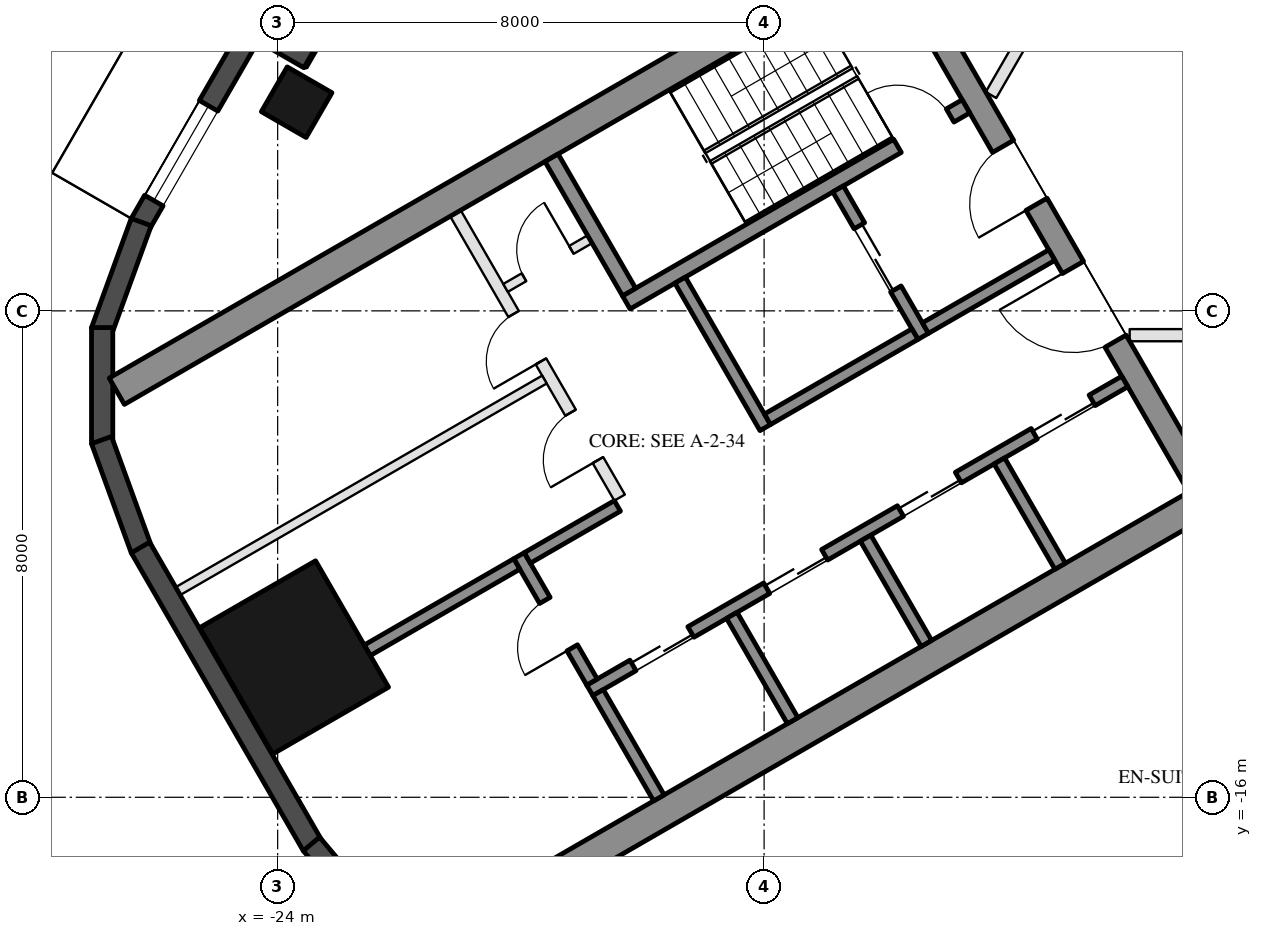
"""IFC4 building model, lengths in metres.
Left out: names, types, materials, properties, quantities, classifications, styles, units other than length and angle.
Written with IfcOpenShell. Run it as: python <this file> out.ifc"""

import sys

from ifc_helpers import new_model, si_unit, direction, frame, frame_2d, origin, origin_2d, place, context, subcontext, project, spatial, rectangle, hollow_rectangle, extrude, element, fill, save


model = new_model("IFC4")
c1 = context("Model", 3, precision=1e-05, world=origin(), true_north=direction((0.0, 1.0)))
c2 = subcontext(c1, "Body", "Model", "MODEL_VIEW")
j1 = project(units=[si_unit("LENGTHUNIT", "METRE"), si_unit("PLANEANGLEUNIT", "RADIAN")], contexts=[c1])
p1 = place(None, origin())
s1 = spatial("IfcSite", under=j1, at=p1, CompositionType="ELEMENT")
p2 = place(p1, origin())
s2 = spatial("IfcBuilding", under=s1, at=p2, CompositionType="ELEMENT")
p3 = place(p2, frame((0.0, 0.0, 150.3)))
s3 = spatial("IfcBuildingStorey", under=s2, at=p3, CompositionType="ELEMENT", Elevation=150.3)
p4 = place(p3, frame((-23.688, -4.568, 0.0), z_axis=(0.0, 0.0, 1.0), x_axis=(0.5, 0.866025403784, 0.0)))
e1 = element("IfcColumn", 1, at=p4, inside=s3, PredefinedType="COLUMN", context=c2, shape_type="SweptSolid", body=[
    extrude(hollow_rectangle(XDim=0.85, YDim=0.85, WallThickness=0.04, at=origin_2d()), origin(), (0.0, 0.0, 1.0), 3.7),
])
p5 = place(p3, frame((-23.729, -13.7, 0.0), z_axis=(0.0, 0.0, 1.0), x_axis=(-0.5, 0.866025403784, 0.0)))
e2 = element("IfcColumn", 2, at=p5, inside=s3, PredefinedType="COLUMN", context=c2, shape_type="SweptSolid", body=[
    extrude(hollow_rectangle(XDim=2.4, YDim=2.2, WallThickness=0.06, at=origin_2d()), origin(), (0.0, 0.0, 1.0), 3.7),
])
p6 = place(p3, frame((-20.309, 1.934, 0.0), z_axis=(0.0, 0.0, 1.0), x_axis=(-0.499992114976, -0.866029956157, 0.0)))
e3 = element("IfcWall", 3, at=p6, inside=s3, PredefinedType="SOLIDWALL", context=c2, shape_type="SweptSolid", body=[
    extrude(rectangle(XDim=6.74, YDim=0.35, at=frame_2d((3.37, 0.0))), origin(), (0.0, 0.0, 1.0), 3.55),
])
p7 = place(p6, frame((0.77, 0.0, 0.0)))
e4 = element("IfcOpeningElement", 4, at=p7, cuts=e3, PredefinedType="OPENING", context=c2, shape_type="SweptSolid", body=[
    extrude(rectangle(XDim=2.4, YDim=2.4, at=frame_2d((1.2, 1.2))), frame((0.0, 0.185, 0.0), z_axis=(0.0, -1.0, 0.0), x_axis=(1.0, 0.0, 0.0)), (0.0, 0.0, 1.0), 0.37),
])
p8 = place(p6, frame((3.47, 0.0, 0.3)))
e5 = element("IfcOpeningElement", 5, at=p8, cuts=e3, PredefinedType="OPENING", context=c2, shape_type="SweptSolid", body=[
    extrude(rectangle(XDim=2.9, YDim=2.65, at=frame_2d((1.45, 1.325))), frame((0.0, 0.185, 0.0), z_axis=(0.0, -1.0, 0.0), x_axis=(1.0, 0.0, 0.0)), (0.0, 0.0, 1.0), 0.37),
])
p9 = place(p3, frame((-23.481, -3.85, 0.0), z_axis=(0.0, 0.0, 1.0), x_axis=(-0.866092288191, 0.499884134912, 0.0)))
e6 = element("IfcWall", 6, at=p9, inside=s3, PredefinedType="SOLIDWALL", context=c2, shape_type="SweptSolid", body=[
    extrude(rectangle(XDim=1.22, YDim=0.35, at=frame_2d((0.61, 0.0))), origin(), (0.0, 0.0, 1.0), 3.55),
])
p10 = place(p3, frame((-24.299, -3.176, 0.0), z_axis=(0.0, 0.0, 1.0), x_axis=(-0.500028278809, -0.866009076391, 0.0)))
e7 = element("IfcWall", 7, at=p10, inside=s3, PredefinedType="SOLIDWALL", context=c2, shape_type="SweptSolid", body=[
    extrude(rectangle(XDim=3.916, YDim=0.35, at=frame_2d((1.958, 0.0))), origin(), (0.0, 0.0, 1.0), 3.55),
])
p11 = place(p10, frame((1.675, 0.0, 0.3)))
e8 = element("IfcOpeningElement", 8, at=p11, cuts=e7, PredefinedType="OPENING", context=c2, shape_type="SweptSolid", body=[
    extrude(rectangle(XDim=1.8, YDim=2.65, at=frame_2d((0.9, 1.325))), frame((0.0, 0.185, 0.0), z_axis=(0.0, -1.0, 0.0), x_axis=(1.0, 0.0, 0.0)), (0.0, 0.0, 1.0), 0.37),
])
for number, where, z_axis, x_axis in (
    (9, (-26.244, -6.54, 0.0), (0.0, 0.0, 1.0), (-0.342, -0.94, 0.0)),
    (10, (-26.886, -8.275, 0.0), (0.0, 0.0, 1.0), (0.0, -1.0, 0.0)),
    (11, (-26.897, -10.125, 0.0), (0.0, 0.0, 1.0), (0.342, -0.94, 0.0)),
):
    element("IfcWall", number, at=place(p3, frame(where, z_axis=z_axis, x_axis=x_axis)), inside=s3, PredefinedType="SOLIDWALL", context=c2, shape_type="SweptSolid", body=[
        extrude(rectangle(XDim=1.91, YDim=0.35, at=frame_2d((0.955, 0.0))), origin(), (0.0, 0.0, 1.0), 3.55),
    ])
p12 = place(p3, frame((-26.257, -11.893, 0.0), z_axis=(0.0, 0.0, 1.0), x_axis=(0.500018773155, -0.866014564827, 0.0)))
e12 = element("IfcWall", 12, at=p12, inside=s3, PredefinedType="SOLIDWALL", context=c2, shape_type="SweptSolid", body=[
    extrude(rectangle(XDim=5.658, YDim=0.35, at=frame_2d((2.829, 0.0))), origin(), (0.0, 0.0, 1.0), 3.55),
])
p13 = place(p3, frame((-23.445, -16.768, 0.0), z_axis=(0.0, 0.0, 1.0), x_axis=(0.642733291068, -0.76609001857, 0.0)))
e13 = element("IfcWall", 13, at=p13, inside=s3, PredefinedType="SOLIDWALL", context=c2, shape_type="SweptSolid", body=[
    extrude(rectangle(XDim=1.91, YDim=0.35, at=frame_2d((0.955, 0.0))), origin(), (0.0, 0.0, 1.0), 3.55),
])
for number, where, z_axis, x_axis in (
    (14, (-13.797, -1.903, 0.0), (0.0, 0.0, 1.0), (-0.866, -0.5, 0.0)),
    (15, (-8.547, -10.997, 0.0), (0.0, 0.0, 1.0), (-0.866, -0.5, 0.0)),
):
    element("IfcWall", number, at=place(p3, frame(where, z_axis=z_axis, x_axis=x_axis)), inside=s3, PredefinedType="SHEAR", context=c2, shape_type="SweptSolid", body=[
        extrude(rectangle(XDim=14.837, YDim=0.5, at=frame_2d((7.418, 0.0))), origin(), (0.0, 0.0, 1.0), 3.5),
    ])
p14 = place(p3, frame((-13.845, -2.22, 0.0), z_axis=(0.0, 0.0, 1.0), x_axis=(0.500004234368, -0.866022959057, 0.0)))
e16 = element("IfcWall", 16, at=p14, inside=s3, PredefinedType="SHEAR", context=c2, shape_type="SweptSolid", body=[
    extrude(rectangle(XDim=10.0, YDim=0.4, at=frame_2d((5.0, 0.0))), origin(), (0.0, 0.0, 1.0), 3.5),
])
p15 = place(p14, frame((3.55, 0.0, 0.0)))
e17 = element("IfcOpeningElement", 17, at=p15, cuts=e16, PredefinedType="OPENING", context=c2, shape_type="SweptSolid", body=[
    extrude(rectangle(XDim=1.1, YDim=2.1, at=frame_2d((0.55, 1.05))), frame((0.0, 0.21, 0.0), z_axis=(0.0, -1.0, 0.0), x_axis=(1.0, 0.0, 0.0)), (0.0, 0.0, 1.0), 0.42),
])
p16 = place(p14, frame((5.85, 0.0, 0.0)))
e18 = element("IfcOpeningElement", 18, at=p16, cuts=e16, PredefinedType="OPENING", context=c2, shape_type="SweptSolid", body=[
    extrude(rectangle(XDim=1.4, YDim=2.1, at=frame_2d((0.7, 1.05))), frame((0.0, 0.21, 0.0), z_axis=(0.0, -1.0, 0.0), x_axis=(1.0, 0.0, 0.0)), (0.0, 0.0, 1.0), 0.42),
])
p17 = place(p3, frame((-12.681, -4.636, 0.0), z_axis=(0.0, 0.0, 1.0), x_axis=(-0.866021702275, -0.500006411147, 0.0)))
e19 = element("IfcWall", 19, at=p17, inside=s3, PredefinedType="SHEAR", context=c2, shape_type="SweptSolid", body=[
    extrude(rectangle(XDim=6.45, YDim=0.25, at=frame_2d((3.225, 0.0))), origin(), (0.0, 0.0, 1.0), 3.5),
])
p18 = place(p17, frame((0.3, 0.0, 0.0)))
e20 = element("IfcOpeningElement", 20, at=p18, cuts=e19, PredefinedType="OPENING", context=c2, shape_type="SweptSolid", body=[
    extrude(rectangle(XDim=1.0, YDim=2.1, at=frame_2d((0.5, 1.05))), frame((0.0, 0.135, 0.0), z_axis=(0.0, -1.0, 0.0), x_axis=(1.0, 0.0, 0.0)), (0.0, 0.0, 1.0), 0.27),
])
p19 = place(p3, frame((-19.496, -5.482, 0.0), z_axis=(0.0, 0.0, 1.0), x_axis=(0.499990435942, -0.866030925526, 0.0)))
e21 = element("IfcWall", 21, at=p19, inside=s3, PredefinedType="SHEAR", context=c2, shape_type="SweptSolid", body=[
    extrude(rectangle(XDim=2.55, YDim=0.25, at=frame_2d((1.275, 0.0))), origin(), (0.0, 0.0, 1.0), 3.5),
])
p20 = place(p3, frame((-17.381, -7.495, 0.0), z_axis=(0.0, 0.0, 1.0), x_axis=(0.500011755427, -0.866018616679, 0.0)))
e22 = element("IfcWall", 22, at=p20, inside=s3, PredefinedType="SHEAR", context=c2, shape_type="SweptSolid", body=[
    extrude(rectangle(XDim=2.8, YDim=0.2, at=frame_2d((1.4, 0.0))), origin(), (0.0, 0.0, 1.0), 3.5),
])
p21 = place(p3, frame((-14.783, -5.995, 0.0), z_axis=(0.0, 0.0, 1.0), x_axis=(0.49994636267, -0.866056369097, 0.0)))
e23 = element("IfcWall", 23, at=p21, inside=s3, PredefinedType="SHEAR", context=c2, shape_type="SweptSolid", body=[
    extrude(rectangle(XDim=2.8, YDim=0.2, at=frame_2d((1.4, 0.0))), origin(), (0.0, 0.0, 1.0), 3.5),
])
p22 = place(p21, frame((0.7, 0.0, 0.0)))
e24 = element("IfcOpeningElement", 24, at=p22, cuts=e23, PredefinedType="OPENING", context=c2, shape_type="SweptSolid", body=[
    extrude(rectangle(XDim=1.2, YDim=2.1, at=frame_2d((0.6, 1.05))), frame((0.0, 0.11, 0.0), z_axis=(0.0, -1.0, 0.0), x_axis=(1.0, 0.0, 0.0)), (0.0, 0.0, 1.0), 0.22),
])
p23 = place(p3, frame((-13.52, -8.383, 0.0), z_axis=(0.0, 0.0, 1.0), x_axis=(-0.866034573852, -0.49998411664, 0.0)))
e25 = element("IfcWall", 25, at=p23, inside=s3, PredefinedType="SHEAR", context=c2, shape_type="SweptSolid", body=[
    extrude(rectangle(XDim=2.8, YDim=0.2, at=frame_2d((1.4, 0.0))), origin(), (0.0, 0.0, 1.0), 3.5),
])
p24 = place(p3, frame((-11.268, -7.083, 0.0), z_axis=(0.0, 0.0, 1.0), x_axis=(-0.866050077142, -0.499957262057, 0.0)))
e26 = element("IfcWall", 26, at=p24, inside=s3, PredefinedType="SHEAR", context=c2, shape_type="SweptSolid", body=[
    extrude(rectangle(XDim=2.4, YDim=0.2, at=frame_2d((1.2, 0.0))), origin(), (0.0, 0.0, 1.0), 3.5),
])
p25 = place(p3, frame((-10.068, -9.162, 0.0), z_axis=(0.0, 0.0, 1.0), x_axis=(-0.866032725843, -0.499987317609, 0.0)))
e27 = element("IfcWall", 27, at=p25, inside=s3, PredefinedType="SHEAR", context=c2, shape_type="SweptSolid", body=[
    extrude(rectangle(XDim=10.16, YDim=0.2, at=frame_2d((5.08, 0.0))), origin(), (0.0, 0.0, 1.0), 3.5),
])
p26 = place(p25, frame((0.62, 0.0, 0.0)))
e28 = element("IfcOpeningElement", 28, at=p26, cuts=e27, PredefinedType="OPENING", context=c2, shape_type="SweptSolid", body=[
    extrude(rectangle(XDim=1.1, YDim=2.1, at=frame_2d((0.55, 1.05))), frame((0.0, 0.11, 0.0), z_axis=(0.0, -1.0, 0.0), x_axis=(1.0, 0.0, 0.0)), (0.0, 0.0, 1.0), 0.22),
])
p27 = place(p25, frame((3.16, 0.0, 0.0)))
e29 = element("IfcOpeningElement", 29, at=p27, cuts=e27, PredefinedType="OPENING", context=c2, shape_type="SweptSolid", body=[
    extrude(rectangle(XDim=1.1, YDim=2.1, at=frame_2d((0.55, 1.05))), frame((0.0, 0.11, 0.0), z_axis=(0.0, -1.0, 0.0), x_axis=(1.0, 0.0, 0.0)), (0.0, 0.0, 1.0), 0.22),
])
p28 = place(p25, frame((5.7, 0.0, 0.0)))
e30 = element("IfcOpeningElement", 30, at=p28, cuts=e27, PredefinedType="OPENING", context=c2, shape_type="SweptSolid", body=[
    extrude(rectangle(XDim=1.1, YDim=2.1, at=frame_2d((0.55, 1.05))), frame((0.0, 0.11, 0.0), z_axis=(0.0, -1.0, 0.0), x_axis=(1.0, 0.0, 0.0)), (0.0, 0.0, 1.0), 0.22),
])
p29 = place(p25, frame((8.24, 0.0, 0.0)))
e31 = element("IfcOpeningElement", 31, at=p29, cuts=e27, PredefinedType="OPENING", context=c2, shape_type="SweptSolid", body=[
    extrude(rectangle(XDim=1.1, YDim=2.1, at=frame_2d((0.55, 1.05))), frame((0.0, 0.11, 0.0), z_axis=(0.0, -1.0, 0.0), x_axis=(1.0, 0.0, 0.0)), (0.0, 0.0, 1.0), 0.22),
])
p30 = place(p3, frame((-20.031, -12.026, 0.0), z_axis=(0.0, 0.0, 1.0), x_axis=(0.500033551112, -0.866006032174, 0.0)))
e32 = element("IfcWall", 32, at=p30, inside=s3, PredefinedType="SHEAR", context=c2, shape_type="SweptSolid", body=[
    extrude(rectangle(XDim=2.4, YDim=0.2, at=frame_2d((1.2, 0.0))), origin(), (0.0, 0.0, 1.0), 3.5),
])
p31 = place(p30, frame((0.85, 0.0, 0.0)))
e33 = element("IfcOpeningElement", 33, at=p31, cuts=e32, PredefinedType="OPENING", context=c2, shape_type="SweptSolid", body=[
    extrude(rectangle(XDim=0.9, YDim=2.1, at=frame_2d((0.45, 1.05))), frame((0.0, 0.11, 0.0), z_axis=(0.0, -1.0, 0.0), x_axis=(1.0, 0.0, 0.0)), (0.0, 0.0, 1.0), 0.22),
])
p32 = place(p3, frame((-18.413, -11.208, 0.0), z_axis=(0.0, 0.0, 1.0), x_axis=(-0.866038183914, -0.499977863513, 0.0)))
e34 = element("IfcWall", 34, at=p32, inside=s3, PredefinedType="SHEAR", context=c2, shape_type="SweptSolid", body=[
    extrude(rectangle(XDim=1.71, YDim=0.2, at=frame_2d((0.855, 0.0))), origin(), (0.0, 0.0, 1.0), 3.5),
])
for number, where, z_axis, x_axis in (
    (35, (-12.131, -10.468, 0.0), (0.0, 0.0, 1.0), (0.5, -0.866, 0.0)),
    (36, (-14.331, -11.738, 0.0), (0.0, 0.0, 1.0), (0.5, -0.866, 0.0)),
    (37, (-16.531, -13.008, 0.0), (0.0, 0.0, 1.0), (0.5, -0.866, 0.0)),
    (38, (-18.73, -14.278, 0.0), (0.0, 0.0, 1.0), (0.5, -0.866, 0.0)),
):
    element("IfcWall", number, at=place(p3, frame(where, z_axis=z_axis, x_axis=x_axis)), inside=s3, PredefinedType="SHEAR", context=c2, shape_type="SweptSolid", body=[
        extrude(rectangle(XDim=2.0, YDim=0.2, at=frame_2d((1.0, 0.0))), origin(), (0.0, 0.0, 1.0), 3.5),
    ])
p33 = place(p3, frame((-20.067, -12.163, 0.0), z_axis=(0.0, 0.0, 1.0), x_axis=(-0.866055327414, -0.49994816717, 0.0)))
e39 = element("IfcWall", 39, at=p33, inside=s3, PredefinedType="SHEAR", context=c2, shape_type="SweptSolid", body=[
    extrude(rectangle(XDim=2.84, YDim=0.2, at=frame_2d((1.42, 0.0))), origin(), (0.0, 0.0, 1.0), 3.5),
])
p34 = place(p3, frame((-21.076, -6.395, 0.0), z_axis=(0.0, 0.0, 1.0), x_axis=(0.50001468107, -0.866016927499, 0.0)))
e40 = element("IfcWall", 40, at=p34, inside=s3, PredefinedType="PARTITIONING", context=c2, shape_type="SweptSolid", body=[
    extrude(rectangle(XDim=5.4, YDim=0.2, at=frame_2d((2.7, 0.0))), origin(), (0.0, 0.0, 1.0), 3.5),
])
p35 = place(p34, frame((1.913, 0.0, 0.0)))
e41 = element("IfcOpeningElement", 41, at=p35, cuts=e40, PredefinedType="OPENING", context=c2, shape_type="SweptSolid", body=[
    extrude(rectangle(XDim=0.9, YDim=2.1, at=frame_2d((0.45, 1.05))), frame((0.0, 0.11, 0.0), z_axis=(0.0, -1.0, 0.0), x_axis=(1.0, 0.0, 0.0)), (0.0, 0.0, 1.0), 0.22),
])
p36 = place(p34, frame((3.788, 0.0, 0.0)))
e42 = element("IfcOpeningElement", 42, at=p36, cuts=e40, PredefinedType="OPENING", context=c2, shape_type="SweptSolid", body=[
    extrude(rectangle(XDim=0.9, YDim=2.1, at=frame_2d((0.45, 1.05))), frame((0.0, 0.11, 0.0), z_axis=(0.0, -1.0, 0.0), x_axis=(1.0, 0.0, 0.0)), (0.0, 0.0, 1.0), 0.22),
])
p37 = place(p3, frame((-18.866, -6.822, 0.0), z_axis=(0.0, 0.0, 1.0), x_axis=(-0.866028054938, -0.499995408039, 0.0)))
e43 = element("IfcWall", 43, at=p37, inside=s3, PredefinedType="PARTITIONING", context=c2, shape_type="SweptSolid", body=[
    extrude(rectangle(XDim=1.6, YDim=0.15, at=frame_2d((0.8, 0.0))), origin(), (0.0, 0.0, 1.0), 3.5),
])
p38 = place(p37, frame((0.35, 0.0, 0.0)))
e44 = element("IfcOpeningElement", 44, at=p38, cuts=e43, PredefinedType="OPENING", context=c2, shape_type="SweptSolid", body=[
    extrude(rectangle(XDim=0.9, YDim=2.1, at=frame_2d((0.45, 1.05))), frame((0.0, 0.085, 0.0), z_axis=(0.0, -1.0, 0.0), x_axis=(1.0, 0.0, 0.0)), (0.0, 0.0, 1.0), 0.17),
])
p39 = place(p3, frame((-19.613, -9.13, 0.0), z_axis=(0.0, 0.0, 1.0), x_axis=(-0.866031734426, -0.499989034847, 0.0)))
e45 = element("IfcWall", 45, at=p39, inside=s3, PredefinedType="PARTITIONING", context=c2, shape_type="SweptSolid", body=[
    extrude(rectangle(XDim=6.95, YDim=0.15, at=frame_2d((3.475, 0.0))), origin(), (0.0, 0.0, 1.0), 3.5),
])
p40 = place(p3, frame((-6.206, -8.4, 0.0), z_axis=(0.0, 0.0, 1.0), x_axis=(-1.0, 0.0, 0.0)))
e46 = element("IfcWall", 46, at=p40, inside=s3, PredefinedType="PARTITIONING", context=c2, shape_type="SweptSolid", body=[
    extrude(rectangle(XDim=3.782, YDim=0.2, at=frame_2d((1.891, 0.0))), origin(), (0.0, 0.0, 1.0), 2.95),
])
p41 = place(p40, frame((1.391, 0.0, 0.0)))
e47 = element("IfcOpeningElement", 47, at=p41, cuts=e46, PredefinedType="OPENING", context=c2, shape_type="SweptSolid", body=[
    extrude(rectangle(XDim=1.0, YDim=2.1, at=frame_2d((0.5, 1.05))), frame((0.0, 0.11, 0.0), z_axis=(0.0, -1.0, 0.0), x_axis=(1.0, 0.0, 0.0)), (0.0, 0.0, 1.0), 0.22),
])
p42 = place(p3, frame((-12.269, -4.45, 0.0), z_axis=(0.0, 0.0, 1.0), x_axis=(0.500000259638, 0.866025253883, 0.0)))
e48 = element("IfcWall", 48, at=p42, inside=s3, PredefinedType="PARTITIONING", context=c2, shape_type="SweptSolid", body=[
    extrude(rectangle(XDim=4.488, YDim=0.2, at=frame_2d((2.244, 0.0))), origin(), (0.0, 0.0, 1.0), 2.95),
])
p43 = place(p42, frame((1.744, 0.0, 0.0)))
e49 = element("IfcOpeningElement", 49, at=p43, cuts=e48, PredefinedType="OPENING", context=c2, shape_type="SweptSolid", body=[
    extrude(rectangle(XDim=1.0, YDim=2.1, at=frame_2d((0.5, 1.05))), frame((0.0, 0.11, 0.0), z_axis=(0.0, -1.0, 0.0), x_axis=(1.0, 0.0, 0.0)), (0.0, 0.0, 1.0), 0.22),
])
p44 = place(p11, origin())
e50 = element("IfcWindow", 50, at=p44, inside=s3, PartitioningType="SINGLE_PANEL", PredefinedType="WINDOW", context=c2, shape_type="SweptSolid", body=[
    extrude(rectangle(XDim=1.8, YDim=2.65, at=frame_2d((0.9, 1.325))), frame((0.0, 0.03, 0.0), z_axis=(0.0, -1.0, 0.0), x_axis=(1.0, 0.0, 0.0)), (0.0, 0.0, 1.0), 0.06),
])
fill(e8, e50)
p45 = place(p22, origin())
e51 = element("IfcDoor", 51, at=p45, inside=s3, OperationType="DOUBLE_DOOR_SLIDING", PredefinedType="DOOR", context=c2, shape_type="SweptSolid", body=[
    extrude(rectangle(XDim=1.2, YDim=2.1, at=frame_2d((0.6, 1.05))), frame((0.0, 0.025, 0.0), z_axis=(0.0, -1.0, 0.0), x_axis=(1.0, 0.0, 0.0)), (0.0, 0.0, 1.0), 0.05),
])
fill(e24, e51)
p46 = place(p38, frame((0.9, 0.0, 0.0), z_axis=(0.0, 0.0, 1.0), x_axis=(-1.0, 0.0, 0.0)))
e52 = element("IfcDoor", 52, at=p46, inside=s3, OperationType="SINGLE_SWING_RIGHT", PredefinedType="DOOR", context=c2, shape_type="SweptSolid", body=[
    extrude(rectangle(XDim=0.9, YDim=2.1, at=frame_2d((0.45, 1.05))), frame((0.0, 0.025, 0.0), z_axis=(0.0, -1.0, 0.0), x_axis=(1.0, 0.0, 0.0)), (0.0, 0.0, 1.0), 0.05),
])
fill(e44, e52)
p47 = place(p26, origin())
e53 = element("IfcDoor", 53, at=p47, inside=s3, OperationType="DOUBLE_DOOR_SLIDING", PredefinedType="DOOR", context=c2, shape_type="SweptSolid", body=[
    extrude(rectangle(XDim=1.1, YDim=2.1, at=frame_2d((0.55, 1.05))), frame((0.0, 0.025, 0.0), z_axis=(0.0, -1.0, 0.0), x_axis=(1.0, 0.0, 0.0)), (0.0, 0.0, 1.0), 0.05),
])
fill(e28, e53)
p48 = place(p27, origin())
e54 = element("IfcDoor", 54, at=p48, inside=s3, OperationType="DOUBLE_DOOR_SLIDING", PredefinedType="DOOR", context=c2, shape_type="SweptSolid", body=[
    extrude(rectangle(XDim=1.1, YDim=2.1, at=frame_2d((0.55, 1.05))), frame((0.0, 0.025, 0.0), z_axis=(0.0, -1.0, 0.0), x_axis=(1.0, 0.0, 0.0)), (0.0, 0.0, 1.0), 0.05),
])
fill(e29, e54)
p49 = place(p28, origin())
e55 = element("IfcDoor", 55, at=p49, inside=s3, OperationType="DOUBLE_DOOR_SLIDING", PredefinedType="DOOR", context=c2, shape_type="SweptSolid", body=[
    extrude(rectangle(XDim=1.1, YDim=2.1, at=frame_2d((0.55, 1.05))), frame((0.0, 0.025, 0.0), z_axis=(0.0, -1.0, 0.0), x_axis=(1.0, 0.0, 0.0)), (0.0, 0.0, 1.0), 0.05),
])
fill(e30, e55)
p50 = place(p29, origin())
e56 = element("IfcDoor", 56, at=p50, inside=s3, OperationType="DOUBLE_DOOR_SLIDING", PredefinedType="DOOR", context=c2, shape_type="SweptSolid", body=[
    extrude(rectangle(XDim=1.1, YDim=2.1, at=frame_2d((0.55, 1.05))), frame((0.0, 0.025, 0.0), z_axis=(0.0, -1.0, 0.0), x_axis=(1.0, 0.0, 0.0)), (0.0, 0.0, 1.0), 0.05),
])
fill(e31, e56)
p51 = place(p31, frame((0.9, 0.0, 0.0), z_axis=(0.0, 0.0, 1.0), x_axis=(-1.0, 0.0, 0.0)))
e57 = element("IfcDoor", 57, at=p51, inside=s3, OperationType="SINGLE_SWING_LEFT", PredefinedType="DOOR", context=c2, shape_type="SweptSolid", body=[
    extrude(rectangle(XDim=0.9, YDim=2.1, at=frame_2d((0.45, 1.05))), frame((0.0, 0.025, 0.0), z_axis=(0.0, -1.0, 0.0), x_axis=(1.0, 0.0, 0.0)), (0.0, 0.0, 1.0), 0.05),
])
fill(e33, e57)
p52 = place(p35, frame((0.9, 0.0, 0.0), z_axis=(0.0, 0.0, 1.0), x_axis=(-1.0, 0.0, 0.0)))
e58 = element("IfcDoor", 58, at=p52, inside=s3, OperationType="SINGLE_SWING_LEFT", PredefinedType="DOOR", context=c2, shape_type="SweptSolid", body=[
    extrude(rectangle(XDim=0.9, YDim=2.1, at=frame_2d((0.45, 1.05))), frame((0.0, 0.025, 0.0), z_axis=(0.0, -1.0, 0.0), x_axis=(1.0, 0.0, 0.0)), (0.0, 0.0, 1.0), 0.05),
])
fill(e41, e58)
p53 = place(p36, frame((0.9, 0.0, 0.0), z_axis=(0.0, 0.0, 1.0), x_axis=(-1.0, 0.0, 0.0)))
e59 = element("IfcDoor", 59, at=p53, inside=s3, OperationType="SINGLE_SWING_LEFT", PredefinedType="DOOR", context=c2, shape_type="SweptSolid", body=[
    extrude(rectangle(XDim=0.9, YDim=2.1, at=frame_2d((0.45, 1.05))), frame((0.0, 0.025, 0.0), z_axis=(0.0, -1.0, 0.0), x_axis=(1.0, 0.0, 0.0)), (0.0, 0.0, 1.0), 0.05),
])
fill(e42, e59)
p54 = place(p15, frame((1.1, 0.0, 0.0), z_axis=(0.0, 0.0, 1.0), x_axis=(-1.0, 0.0, 0.0)))
e60 = element("IfcDoor", 60, at=p54, inside=s3, OperationType="SINGLE_SWING_LEFT", PredefinedType="DOOR", context=c2, shape_type="SweptSolid", body=[
    extrude(rectangle(XDim=1.1, YDim=2.1, at=frame_2d((0.55, 1.05))), frame((0.0, 0.025, 0.0), z_axis=(0.0, -1.0, 0.0), x_axis=(1.0, 0.0, 0.0)), (0.0, 0.0, 1.0), 0.05),
])
fill(e17, e60)
p55 = place(p16, frame((1.4, 0.0, 0.0), z_axis=(0.0, 0.0, 1.0), x_axis=(-1.0, 0.0, 0.0)))
e61 = element("IfcDoor", 61, at=p55, inside=s3, OperationType="DOUBLE_DOOR_SINGLE_SWING", PredefinedType="DOOR", context=c2, shape_type="SweptSolid", body=[
    extrude(rectangle(XDim=1.4, YDim=2.1, at=frame_2d((0.7, 1.05))), frame((0.0, 0.025, 0.0), z_axis=(0.0, -1.0, 0.0), x_axis=(1.0, 0.0, 0.0)), (0.0, 0.0, 1.0), 0.05),
])
fill(e18, e61)
p56 = place(p18, frame((1.0, 0.0, 0.0), z_axis=(0.0, 0.0, 1.0), x_axis=(-1.0, 0.0, 0.0)))
e62 = element("IfcDoor", 62, at=p56, inside=s3, OperationType="SINGLE_SWING_LEFT", PredefinedType="DOOR", context=c2, shape_type="SweptSolid", body=[
    extrude(rectangle(XDim=1.0, YDim=2.1, at=frame_2d((0.5, 1.05))), frame((0.0, 0.025, 0.0), z_axis=(0.0, -1.0, 0.0), x_axis=(1.0, 0.0, 0.0)), (0.0, 0.0, 1.0), 0.05),
])
fill(e20, e62)
save(model, sys.argv[1])
